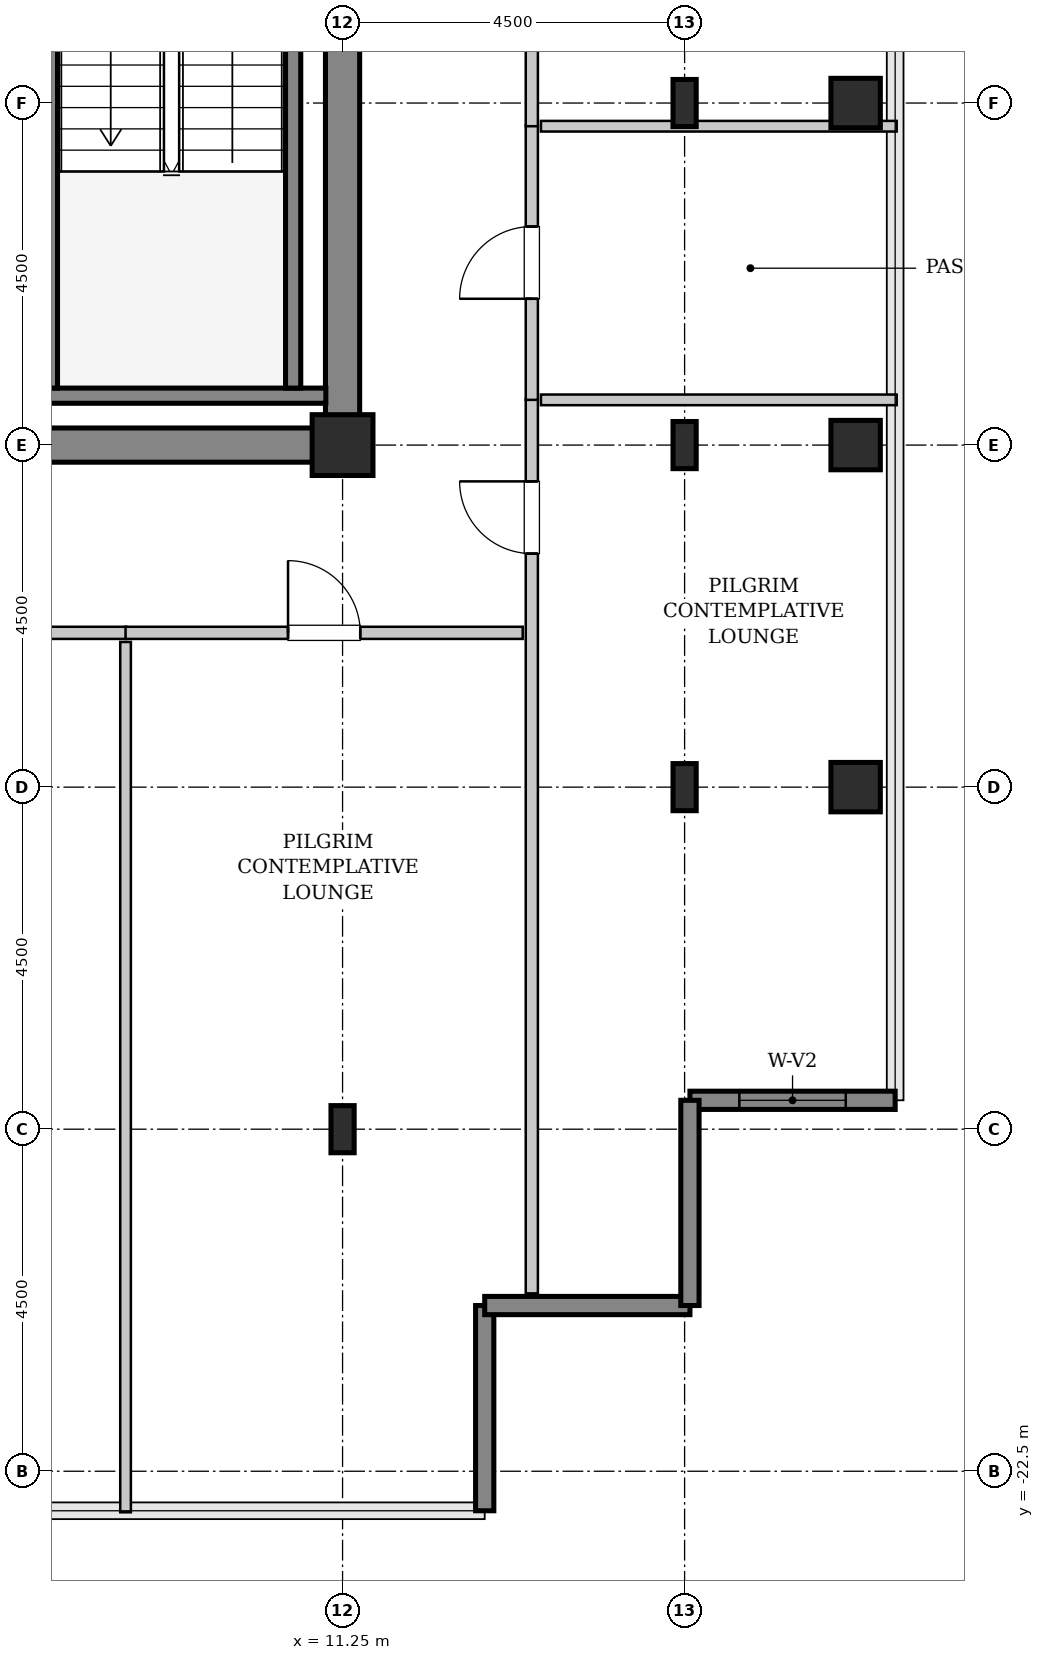
"""IFC4 building model, lengths in metres.
Left out: names, types, materials, properties, quantities, classifications, styles, units other than length and angle.
Written with IfcOpenShell. Run it as: python <this file> out.ifc"""

import sys

from ifc_helpers import new_model, si_unit, direction, frame, frame_2d, origin, origin_2d, place, context, subcontext, project, spatial, rectangle, hollow_rectangle, i_section, extrude, source, transform, mapped, element, fill, save


model = new_model("IFC4")
c1 = context("Model", 3, precision=1e-05, world=origin(), true_north=direction((0.0, 1.0)))
c2 = subcontext(c1, "Body", "Model", "MODEL_VIEW")
j1 = project(units=[si_unit("LENGTHUNIT", "METRE"), si_unit("PLANEANGLEUNIT", "RADIAN")], contexts=[c1])
p1 = place(None, origin())
s1 = spatial("IfcSite", under=j1, at=p1, CompositionType="ELEMENT")
p2 = place(p1, origin())
s2 = spatial("IfcBuilding", under=s1, at=p2, CompositionType="ELEMENT")
p3 = place(p2, frame((0.0, 0.0, 268.4)))
s3 = spatial("IfcBuildingStorey", under=s2, at=p3, CompositionType="ELEMENT", Elevation=268.4)
m1 = source(origin(), c2, "Body", "SweptSolid", [
    extrude(rectangle(XDim=9.925, YDim=0.45, at=frame_2d((4.962, 0.0))), origin(), (0.0, 0.0, 1.0), 3.8),
])
p4 = place(p3, frame((1.55, -9.0, 0.0), z_axis=(0.0, 0.0, 1.0), x_axis=(1.0, 0.0, 0.0)))
e1 = element("IfcWall", 1, at=p4, inside=s3, PredefinedType="SHEAR", context=c2, shape_type="MappedRepresentation", body=[
    mapped(m1, transform((0.0, 0.0, 0.0), x_axis=(1.0, 0.0, 0.0), y_axis=(0.0, 1.0, 0.0), z_axis=(0.0, 0.0, 1.0), scale=1.0)),
])
m2 = source(origin(), c2, "Body", "SweptSolid", [
    extrude(rectangle(XDim=7.425, YDim=0.45, at=frame_2d((3.712, 0.0))), origin(), (0.0, 0.0, 1.0), 3.8),
])
p5 = place(p3, frame((11.25, -8.775, 0.0), z_axis=(0.0, 0.0, 1.0), x_axis=(0.0, 1.0, 0.0)))
e2 = element("IfcWall", 2, at=p5, inside=s3, PredefinedType="SHEAR", context=c2, shape_type="MappedRepresentation", body=[
    mapped(m2, transform((0.0, 0.0, 0.0), x_axis=(1.0, 0.0, 0.0), y_axis=(0.0, 1.0, 0.0), z_axis=(0.0, 0.0, 1.0), scale=1.0)),
])
m3 = source(origin(), c2, "Body", "SweptSolid", [
    extrude(i_section(OverallWidth=0.305, OverallDepth=0.62, WebThickness=0.021, FlangeThickness=0.04, FilletRadius=0.027, at=origin_2d()), origin(), (0.0, 0.0, 1.0), 3.8),
])
p6 = place(p3, frame((11.25, -18.0, 0.0), z_axis=(0.0, 0.0, 1.0), x_axis=(1.0, 0.0, 0.0)))
e3 = element("IfcColumn", 3, at=p6, inside=s3, PredefinedType="COLUMN", context=c2, shape_type="MappedRepresentation", body=[
    mapped(m3, transform((0.0, 0.0, 0.0), x_axis=(1.0, 0.0, 0.0), y_axis=(0.0, 1.0, 0.0), z_axis=(0.0, 0.0, 1.0), scale=1.0)),
])
m4 = source(origin(), c2, "Body", "SweptSolid", [
    extrude(hollow_rectangle(XDim=0.8, YDim=0.8, WallThickness=0.04, InnerFilletRadius=0.04, OuterFilletRadius=0.08, at=origin_2d()), origin(), (0.0, 0.0, 1.0), 3.8),
])
p7 = place(p3, frame((11.25, -9.0, 0.0), z_axis=(0.0, 0.0, 1.0), x_axis=(1.0, 0.0, 0.0)))
e4 = element("IfcColumn", 4, at=p7, inside=s3, PredefinedType="COLUMN", context=c2, shape_type="MappedRepresentation", body=[
    mapped(m4, transform((0.0, 0.0, 0.0), x_axis=(1.0, 0.0, 0.0), y_axis=(0.0, 1.0, 0.0), z_axis=(0.0, 0.0, 1.0), scale=1.0)),
])
for number, where, z_axis, x_axis in (
    (5, (15.75, -13.5, 0.0), (0.0, 0.0, 1.0), (1.0, 0.0, 0.0)),
    (6, (15.75, -9.0, 0.0), (0.0, 0.0, 1.0), (1.0, 0.0, 0.0)),
    (7, (15.75, -4.5, 0.0), (0.0, 0.0, 1.0), (1.0, 0.0, 0.0)),
):
    element("IfcColumn", number, at=place(p3, frame(where, z_axis=z_axis, x_axis=x_axis)), inside=s3, PredefinedType="COLUMN", context=c2, shape_type="MappedRepresentation", body=[
        mapped(m3, transform((0.0, 0.0, 0.0), x_axis=(1.0, 0.0, 0.0), y_axis=(0.0, 1.0, 0.0), z_axis=(0.0, 0.0, 1.0), scale=1.0)),
    ])
m5 = source(origin(), c2, "Body", "SweptSolid", [
    extrude(hollow_rectangle(XDim=0.65, YDim=0.65, WallThickness=0.032, InnerFilletRadius=0.032, OuterFilletRadius=0.064, at=origin_2d()), origin(), (0.0, 0.0, 1.0), 3.8),
])
for number, where, z_axis, x_axis in (
    (8, (18.0, -13.5, 0.0), (0.0, 0.0, 1.0), (1.0, 0.0, 0.0)),
    (9, (18.0, -9.0, 0.0), (0.0, 0.0, 1.0), (1.0, 0.0, 0.0)),
    (10, (18.0, -4.5, 0.0), (0.0, 0.0, 1.0), (1.0, 0.0, 0.0)),
):
    element("IfcColumn", number, at=place(p3, frame(where, z_axis=z_axis, x_axis=x_axis)), inside=s3, PredefinedType="COLUMN", context=c2, shape_type="MappedRepresentation", body=[
        mapped(m5, transform((0.0, 0.0, 0.0), x_axis=(1.0, 0.0, 0.0), y_axis=(0.0, 1.0, 0.0), z_axis=(0.0, 0.0, 1.0), scale=1.0)),
    ])
m6 = source(origin(), c2, "Body", "SweptSolid", [
    extrude(rectangle(XDim=2.7, YDim=0.24, at=frame_2d((1.35, 0.0))), origin(), (0.0, 0.0, 1.0), 3.55),
])
p8 = place(p3, frame((15.82, -17.62, 0.0), z_axis=(0.0, 0.0, 1.0), x_axis=(1.0, 0.0, 0.0)))
e11 = element("IfcWall", 11, at=p8, inside=s3, PredefinedType="SHEAR", context=c2, shape_type="MappedRepresentation", body=[
    mapped(m6, transform((0.0, 0.0, 0.0), x_axis=(1.0, 0.0, 0.0), y_axis=(0.0, 1.0, 0.0), z_axis=(0.0, 0.0, 1.0), scale=1.0)),
])
p9 = place(p8, frame((0.65, 0.0, 0.85)))
e12 = element("IfcOpeningElement", 12, at=p9, cuts=e11, PredefinedType="OPENING", context=c2, shape_type="SweptSolid", body=[
    extrude(rectangle(XDim=1.4, YDim=1.8, at=frame_2d((0.7, 0.9))), frame((0.0, 0.13, 0.0), z_axis=(0.0, -1.0, 0.0), x_axis=(1.0, 0.0, 0.0)), (0.0, 0.0, 1.0), 0.26),
])
for number, where, z_axis, x_axis in (
    (13, (13.12, -23.02, 0.0), (0.0, 0.0, 1.0), (0.0, 1.0, 0.0)),
    (14, (13.12, -20.32, 0.0), (0.0, 0.0, 1.0), (1.0, 0.0, 0.0)),
    (15, (15.82, -20.32, 0.0), (0.0, 0.0, 1.0), (0.0, 1.0, 0.0)),
):
    element("IfcWall", number, at=place(p3, frame(where, z_axis=z_axis, x_axis=x_axis)), inside=s3, PredefinedType="SHEAR", context=c2, shape_type="MappedRepresentation", body=[
        mapped(m6, transform((0.0, 0.0, 0.0), x_axis=(1.0, 0.0, 0.0), y_axis=(0.0, 1.0, 0.0), z_axis=(0.0, 0.0, 1.0), scale=1.0)),
    ])
m7 = source(origin(), c2, "Body", "SweptSolid", [
    extrude(rectangle(XDim=3.73, YDim=0.2, at=frame_2d((1.865, 0.0))), origin(), (0.0, 0.0, 1.0), 3.8),
])
p10 = place(p3, frame((7.3, -8.35, 0.0), z_axis=(0.0, 0.0, 1.0), x_axis=(1.0, 0.0, 0.0)))
e16 = element("IfcWall", 16, at=p10, inside=s3, PredefinedType="SOLIDWALL", context=c2, shape_type="MappedRepresentation", body=[
    mapped(m7, transform((0.0, 0.0, 0.0), x_axis=(1.0, 0.0, 0.0), y_axis=(0.0, 1.0, 0.0), z_axis=(0.0, 0.0, 1.0), scale=1.0)),
])
m8 = source(origin(), c2, "Body", "SweptSolid", [
    extrude(rectangle(XDim=7.1, YDim=0.2, at=frame_2d((3.55, 0.0))), origin(), (0.0, 0.0, 1.0), 3.8),
])
p11 = place(p3, frame((7.4, -1.15, 0.0), z_axis=(0.0, 0.0, 1.0), x_axis=(0.0, -1.0, 0.0)))
e17 = element("IfcWall", 17, at=p11, inside=s3, PredefinedType="SOLIDWALL", context=c2, shape_type="MappedRepresentation", body=[
    mapped(m8, transform((0.0, 0.0, 0.0), x_axis=(1.0, 0.0, 0.0), y_axis=(0.0, 1.0, 0.0), z_axis=(0.0, 0.0, 1.0), scale=1.0)),
])
p12 = place(p11, frame((0.18, 0.0, 0.0)))
e18 = element("IfcOpeningElement", 18, at=p12, cuts=e17, PredefinedType="OPENING", context=c2, shape_type="SweptSolid", body=[
    extrude(rectangle(XDim=1.1, YDim=2.15, at=frame_2d((0.55, 1.075))), frame((0.0, 0.11, 0.0), z_axis=(0.0, -1.0, 0.0), x_axis=(1.0, 0.0, 0.0)), (0.0, 0.0, 1.0), 0.22),
])
p13 = place(p3, frame((10.6, -1.15, 0.0), z_axis=(0.0, 0.0, 1.0), x_axis=(0.0, -1.0, 0.0)))
e19 = element("IfcWall", 19, at=p13, inside=s3, PredefinedType="SOLIDWALL", context=c2, shape_type="MappedRepresentation", body=[
    mapped(m8, transform((0.0, 0.0, 0.0), x_axis=(1.0, 0.0, 0.0), y_axis=(0.0, 1.0, 0.0), z_axis=(0.0, 0.0, 1.0), scale=1.0)),
])
m9 = source(origin(), c2, "Body", "SweptSolid", [
    extrude(rectangle(XDim=11.765, YDim=0.16, at=frame_2d((5.882, 0.0))), origin(), (0.0, 0.0, 1.0), 3.535),
])
p14 = place(p3, frame((13.74, -20.16, 0.0), z_axis=(0.0, 0.0, 1.0), x_axis=(0.0, 1.0, 0.0)))
e20 = element("IfcWall", 20, at=p14, inside=s3, PredefinedType="PARTITIONING", context=c2, shape_type="MappedRepresentation", body=[
    mapped(m9, transform((0.0, 0.0, 0.0), x_axis=(1.0, 0.0, 0.0), y_axis=(0.0, 1.0, 0.0), z_axis=(0.0, 0.0, 1.0), scale=1.0)),
])
p15 = place(p14, frame((9.732, 0.0, 0.0)))
e21 = element("IfcOpeningElement", 21, at=p15, cuts=e20, PredefinedType="OPENING", context=c2, shape_type="SweptSolid", body=[
    extrude(rectangle(XDim=0.95, YDim=2.1, at=frame_2d((0.475, 1.05))), frame((0.0, 0.09, 0.0), z_axis=(0.0, -1.0, 0.0), x_axis=(1.0, 0.0, 0.0)), (0.0, 0.0, 1.0), 0.18),
])
m10 = source(origin(), c2, "Body", "SweptSolid", [
    extrude(rectangle(XDim=4.68, YDim=0.14, at=frame_2d((2.34, 0.0))), origin(), (0.0, 0.0, 1.0), 3.535),
])
p16 = place(p3, frame((13.86, -8.405, 0.0), z_axis=(0.0, 0.0, 1.0), x_axis=(1.0, 0.0, 0.0)))
e22 = element("IfcWall", 22, at=p16, inside=s3, PredefinedType="PARTITIONING", context=c2, shape_type="MappedRepresentation", body=[
    mapped(m10, transform((0.0, 0.0, 0.0), x_axis=(1.0, 0.0, 0.0), y_axis=(0.0, 1.0, 0.0), z_axis=(0.0, 0.0, 1.0), scale=1.0)),
])
m11 = source(origin(), c2, "Body", "SweptSolid", [
    extrude(rectangle(XDim=3.61, YDim=0.16, at=frame_2d((1.805, 0.0))), origin(), (0.0, 0.0, 1.0), 3.535),
])
p17 = place(p3, frame((13.74, -8.405, 0.0), z_axis=(0.0, 0.0, 1.0), x_axis=(0.0, 1.0, 0.0)))
e23 = element("IfcWall", 23, at=p17, inside=s3, PredefinedType="PARTITIONING", context=c2, shape_type="MappedRepresentation", body=[
    mapped(m11, transform((0.0, 0.0, 0.0), x_axis=(1.0, 0.0, 0.0), y_axis=(0.0, 1.0, 0.0), z_axis=(0.0, 0.0, 1.0), scale=1.0)),
])
p18 = place(p17, frame((1.33, 0.0, 0.0)))
e24 = element("IfcOpeningElement", 24, at=p18, cuts=e23, PredefinedType="OPENING", context=c2, shape_type="SweptSolid", body=[
    extrude(rectangle(XDim=0.95, YDim=2.1, at=frame_2d((0.475, 1.05))), frame((0.0, 0.09, 0.0), z_axis=(0.0, -1.0, 0.0), x_axis=(1.0, 0.0, 0.0)), (0.0, 0.0, 1.0), 0.18),
])
m12 = source(origin(), c2, "Body", "SweptSolid", [
    extrude(rectangle(XDim=4.68, YDim=0.14, at=frame_2d((2.34, 0.0))), origin(), (0.0, 0.0, 1.0), 2.925),
])
p19 = place(p3, frame((13.86, -4.805, 0.0), z_axis=(0.0, 0.0, 1.0), x_axis=(1.0, 0.0, 0.0)))
e25 = element("IfcWall", 25, at=p19, inside=s3, PredefinedType="PARTITIONING", context=c2, shape_type="MappedRepresentation", body=[
    mapped(m12, transform((0.0, 0.0, 0.0), x_axis=(1.0, 0.0, 0.0), y_axis=(0.0, 1.0, 0.0), z_axis=(0.0, 0.0, 1.0), scale=1.0)),
])
m13 = source(origin(), c2, "Body", "SweptSolid", [
    extrude(rectangle(XDim=9.81, YDim=0.16, at=frame_2d((4.905, 0.0))), origin(), (0.0, 0.0, 1.0), 3.535),
])
p20 = place(p3, frame((13.74, -4.805, 0.0), z_axis=(0.0, 0.0, 1.0), x_axis=(0.0, 1.0, 0.0)))
e26 = element("IfcWall", 26, at=p20, inside=s3, PredefinedType="PARTITIONING", context=c2, shape_type="MappedRepresentation", body=[
    mapped(m13, transform((0.0, 0.0, 0.0), x_axis=(1.0, 0.0, 0.0), y_axis=(0.0, 1.0, 0.0), z_axis=(0.0, 0.0, 1.0), scale=1.0)),
])
p21 = place(p20, frame((4.43, 0.0, 0.0)))
e27 = element("IfcOpeningElement", 27, at=p21, cuts=e26, PredefinedType="OPENING", context=c2, shape_type="SweptSolid", body=[
    extrude(rectangle(XDim=0.95, YDim=2.1, at=frame_2d((0.475, 1.05))), frame((0.0, 0.09, 0.0), z_axis=(0.0, -1.0, 0.0), x_axis=(1.0, 0.0, 0.0)), (0.0, 0.0, 1.0), 0.18),
])
m14 = source(origin(), c2, "Body", "SweptSolid", [
    extrude(rectangle(XDim=5.81, YDim=0.16, at=frame_2d((2.905, 0.0))), origin(), (0.0, 0.0, 1.0), 3.535),
])
p22 = place(p3, frame((2.595, -11.47, 0.0), z_axis=(0.0, 0.0, 1.0), x_axis=(1.0, 0.0, 0.0)))
e28 = element("IfcWall", 28, at=p22, inside=s3, PredefinedType="PARTITIONING", context=c2, shape_type="MappedRepresentation", body=[
    mapped(m14, transform((0.0, 0.0, 0.0), x_axis=(1.0, 0.0, 0.0), y_axis=(0.0, 1.0, 0.0), z_axis=(0.0, 0.0, 1.0), scale=1.0)),
])
p23 = place(p22, frame((2.43, 0.0, 0.0)))
e29 = element("IfcOpeningElement", 29, at=p23, cuts=e28, PredefinedType="OPENING", context=c2, shape_type="SweptSolid", body=[
    extrude(rectangle(XDim=0.95, YDim=2.1, at=frame_2d((0.475, 1.05))), frame((0.0, 0.09, 0.0), z_axis=(0.0, -1.0, 0.0), x_axis=(1.0, 0.0, 0.0)), (0.0, 0.0, 1.0), 0.18),
])
m15 = source(origin(), c2, "Body", "SweptSolid", [
    extrude(rectangle(XDim=11.45, YDim=0.14, at=frame_2d((5.725, 0.0))), origin(), (0.0, 0.0, 1.0), 3.535),
])
p24 = place(p3, frame((8.395, -23.04, 0.0), z_axis=(0.0, 0.0, 1.0), x_axis=(0.0, 1.0, 0.0)))
e30 = element("IfcWall", 30, at=p24, inside=s3, PredefinedType="PARTITIONING", context=c2, shape_type="MappedRepresentation", body=[
    mapped(m15, transform((0.0, 0.0, 0.0), x_axis=(1.0, 0.0, 0.0), y_axis=(0.0, 1.0, 0.0), z_axis=(0.0, 0.0, 1.0), scale=1.0)),
])
m16 = source(origin(), c2, "Body", "SweptSolid", [
    extrude(rectangle(XDim=5.225, YDim=0.16, at=frame_2d((2.613, 0.0))), origin(), (0.0, 0.0, 1.0), 3.535),
])
p25 = place(p3, frame((8.395, -11.47, 0.0), z_axis=(0.0, 0.0, 1.0), x_axis=(1.0, 0.0, 0.0)))
e31 = element("IfcWall", 31, at=p25, inside=s3, PredefinedType="PARTITIONING", context=c2, shape_type="MappedRepresentation", body=[
    mapped(m16, transform((0.0, 0.0, 0.0), x_axis=(1.0, 0.0, 0.0), y_axis=(0.0, 1.0, 0.0), z_axis=(0.0, 0.0, 1.0), scale=1.0)),
])
p26 = place(p25, frame((2.137, 0.0, 0.0)))
e32 = element("IfcOpeningElement", 32, at=p26, cuts=e31, PredefinedType="OPENING", context=c2, shape_type="SweptSolid", body=[
    extrude(rectangle(XDim=0.95, YDim=2.1, at=frame_2d((0.475, 1.05))), frame((0.0, 0.09, 0.0), z_axis=(0.0, -1.0, 0.0), x_axis=(1.0, 0.0, 0.0)), (0.0, 0.0, 1.0), 0.18),
])
m17 = source(origin(), c2, "Body", "SweptSolid", [
    extrude(rectangle(XDim=1.4, YDim=1.8, at=frame_2d((0.7, 0.9))), frame((0.0, 0.03, 0.0), z_axis=(0.0, -1.0, 0.0), x_axis=(1.0, 0.0, 0.0)), (0.0, 0.0, 1.0), 0.06),
])
p27 = place(p9, origin())
e33 = element("IfcWindow", 33, at=p27, inside=s3, PartitioningType="SINGLE_PANEL", PredefinedType="WINDOW", context=c2, shape_type="MappedRepresentation", body=[
    mapped(m17, transform((0.0, 0.0, 0.0), x_axis=(1.0, 0.0, 0.0), y_axis=(0.0, 1.0, 0.0), z_axis=(0.0, 0.0, 1.0), scale=1.0)),
])
fill(e12, e33)
m18 = source(origin(), c2, "Body", "SweptSolid", [
    extrude(rectangle(XDim=0.95, YDim=2.1, at=frame_2d((0.475, 1.05))), frame((0.0, 0.025, 0.0), z_axis=(0.0, -1.0, 0.0), x_axis=(1.0, 0.0, 0.0)), (0.0, 0.0, 1.0), 0.05),
])
p28 = place(p15, origin())
e34 = element("IfcDoor", 34, at=p28, inside=s3, OperationType="SINGLE_SWING_RIGHT", PredefinedType="DOOR", context=c2, shape_type="MappedRepresentation", body=[
    mapped(m18, transform((0.0, 0.0, 0.0), x_axis=(1.0, 0.0, 0.0), y_axis=(0.0, 1.0, 0.0), z_axis=(0.0, 0.0, 1.0), scale=1.0)),
])
fill(e21, e34)
p29 = place(p18, origin())
e35 = element("IfcDoor", 35, at=p29, inside=s3, OperationType="SINGLE_SWING_LEFT", PredefinedType="DOOR", context=c2, shape_type="MappedRepresentation", body=[
    mapped(m18, transform((0.0, 0.0, 0.0), x_axis=(1.0, 0.0, 0.0), y_axis=(0.0, 1.0, 0.0), z_axis=(0.0, 0.0, 1.0), scale=1.0)),
])
fill(e24, e35)
p30 = place(p26, origin())
e36 = element("IfcDoor", 36, at=p30, inside=s3, OperationType="SINGLE_SWING_LEFT", PredefinedType="DOOR", context=c2, shape_type="MappedRepresentation", body=[
    mapped(m18, transform((0.0, 0.0, 0.0), x_axis=(1.0, 0.0, 0.0), y_axis=(0.0, 1.0, 0.0), z_axis=(0.0, 0.0, 1.0), scale=1.0)),
])
fill(e32, e36)
save(model, sys.argv[1])
